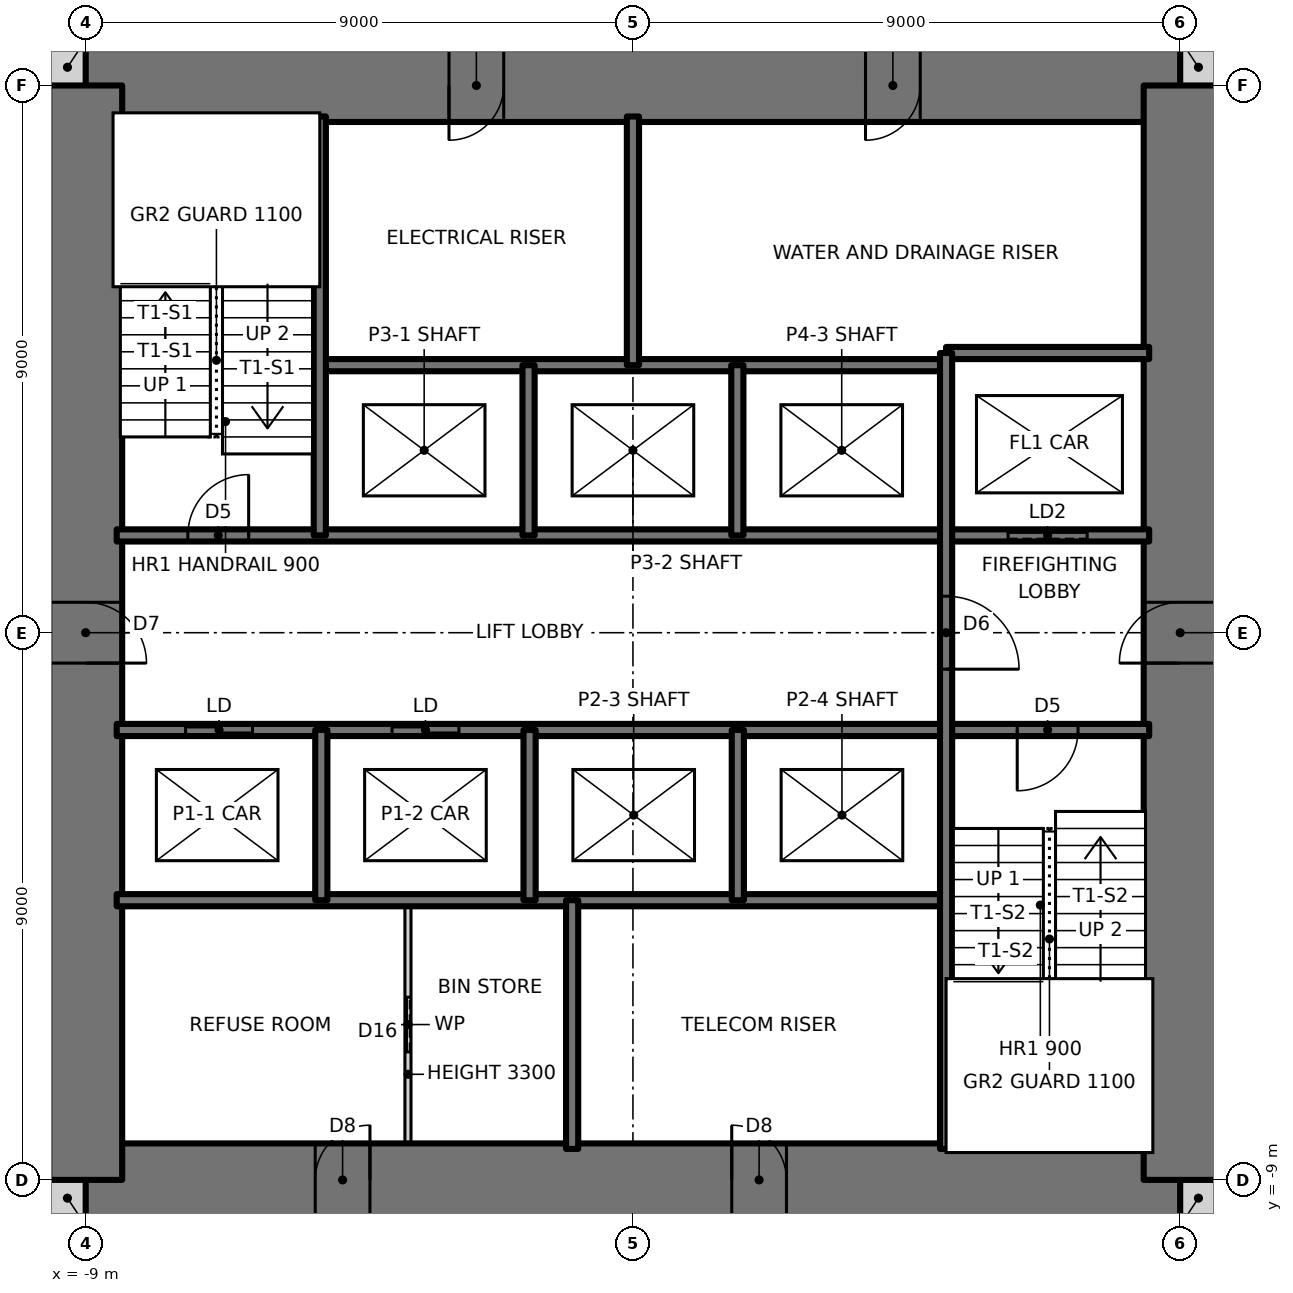
"""IFC4 building model, lengths in metres.
Left out: names, types, materials, properties, quantities, classifications, styles, units other than length and angle.
Written with IfcOpenShell. Run it as: python <this file> out.ifc"""

import sys

from ifc_helpers import new_model, si_unit, direction, frame, frame_2d, origin, place, context, subcontext, project, spatial, rectangle, extrude, element, fill, save


model = new_model("IFC4")
c1 = context("Model", 3, precision=1e-05, world=origin(), true_north=direction((0.0, 1.0)))
c2 = subcontext(c1, "Body", "Model", "MODEL_VIEW")
j1 = project(units=[si_unit("LENGTHUNIT", "METRE"), si_unit("PLANEANGLEUNIT", "RADIAN")], contexts=[c1])
p1 = place(None, origin())
s1 = spatial("IfcSite", under=j1, at=p1, CompositionType="ELEMENT")
p2 = place(p1, origin())
s2 = spatial("IfcBuilding", under=s1, at=p2, CompositionType="ELEMENT")
p3 = place(p2, frame((0.0, 0.0, 36.0)))
s3 = spatial("IfcBuildingStorey", under=s2, at=p3, CompositionType="ELEMENT", Elevation=36.0)
for number, where, z_axis, x_axis in (
    (1, (-9.6, -9.3, 0.0), (0.0, 0.0, 1.0), (1.0, 0.0, 0.0)),
    (2, (9.0, -9.3, 0.0), (0.0, 0.0, 1.0), (1.0, 0.0, 0.0)),
    (3, (9.0, 9.3, 0.0), (0.0, 0.0, 1.0), (1.0, 0.0, 0.0)),
    (4, (-9.6, 9.3, 0.0), (0.0, 0.0, 1.0), (1.0, 0.0, 0.0)),
):
    element("IfcWall", number, at=place(p3, frame(where, z_axis=z_axis, x_axis=x_axis)), inside=s3, PredefinedType="SOLIDWALL", context=c2, shape_type="SweptSolid", body=[
        extrude(rectangle(XDim=0.6, YDim=0.6, at=frame_2d((0.3, 0.0))), origin(), (0.0, 0.0, 1.0), 3.5),
    ])
p4 = place(p3, frame((-9.0, -9.0, 0.0), z_axis=(0.0, 0.0, 1.0), x_axis=(1.0, 0.0, 0.0)))
e5 = element("IfcWall", 5, at=p4, inside=s3, PredefinedType="SHEAR", context=c2, shape_type="SweptSolid", body=[
    extrude(rectangle(XDim=18.0, YDim=1.2, at=frame_2d((9.0, 0.0))), origin(), (0.0, 0.0, 1.0), 3.5),
])
p5 = place(p4, frame((3.775, 0.0, 0.0)))
e6 = element("IfcOpeningElement", 6, at=p5, cuts=e5, PredefinedType="OPENING", context=c2, shape_type="SweptSolid", body=[
    extrude(rectangle(XDim=0.9, YDim=2.1, at=frame_2d((0.45, 1.05))), frame((0.0, 0.61, 0.0), z_axis=(0.0, -1.0, 0.0), x_axis=(1.0, 0.0, 0.0)), (0.0, 0.0, 1.0), 1.22),
])
p6 = place(p4, frame((10.625, 0.0, 0.0)))
e7 = element("IfcOpeningElement", 7, at=p6, cuts=e5, PredefinedType="OPENING", context=c2, shape_type="SweptSolid", body=[
    extrude(rectangle(XDim=0.9, YDim=2.1, at=frame_2d((0.45, 1.05))), frame((0.0, 0.61, 0.0), z_axis=(0.0, -1.0, 0.0), x_axis=(1.0, 0.0, 0.0)), (0.0, 0.0, 1.0), 1.22),
])
p7 = place(p3, frame((9.0, 9.0, 0.0), z_axis=(0.0, 0.0, 1.0), x_axis=(-1.0, 0.0, 0.0)))
e8 = element("IfcWall", 8, at=p7, inside=s3, PredefinedType="SHEAR", context=c2, shape_type="SweptSolid", body=[
    extrude(rectangle(XDim=18.0, YDim=1.2, at=frame_2d((9.0, 0.0))), origin(), (0.0, 0.0, 1.0), 3.5),
])
p8 = place(p7, frame((11.125, 0.0, 0.0)))
e9 = element("IfcOpeningElement", 9, at=p8, cuts=e8, PredefinedType="OPENING", context=c2, shape_type="SweptSolid", body=[
    extrude(rectangle(XDim=0.9, YDim=2.1, at=frame_2d((0.45, 1.05))), frame((0.0, 0.61, 0.0), z_axis=(0.0, -1.0, 0.0), x_axis=(1.0, 0.0, 0.0)), (0.0, 0.0, 1.0), 1.22),
])
p9 = place(p7, frame((4.275, 0.0, 0.0)))
e10 = element("IfcOpeningElement", 10, at=p9, cuts=e8, PredefinedType="OPENING", context=c2, shape_type="SweptSolid", body=[
    extrude(rectangle(XDim=0.9, YDim=2.1, at=frame_2d((0.45, 1.05))), frame((0.0, 0.61, 0.0), z_axis=(0.0, -1.0, 0.0), x_axis=(1.0, 0.0, 0.0)), (0.0, 0.0, 1.0), 1.22),
])
p10 = place(p3, frame((9.0, -9.0, 0.0), z_axis=(0.0, 0.0, 1.0), x_axis=(0.0, 1.0, 0.0)))
e11 = element("IfcWall", 11, at=p10, inside=s3, PredefinedType="SHEAR", context=c2, shape_type="SweptSolid", body=[
    extrude(rectangle(XDim=18.0, YDim=1.2, at=frame_2d((9.0, 0.0))), origin(), (0.0, 0.0, 1.0), 3.5),
])
p11 = place(p10, frame((8.5, 0.0, 0.0)))
e12 = element("IfcOpeningElement", 12, at=p11, cuts=e11, PredefinedType="OPENING", context=c2, shape_type="SweptSolid", body=[
    extrude(rectangle(XDim=1.0, YDim=2.1, at=frame_2d((0.5, 1.05))), frame((0.0, 0.61, 0.0), z_axis=(0.0, -1.0, 0.0), x_axis=(1.0, 0.0, 0.0)), (0.0, 0.0, 1.0), 1.22),
])
p12 = place(p3, frame((-9.0, 9.0, 0.0), z_axis=(0.0, 0.0, 1.0), x_axis=(0.0, -1.0, 0.0)))
e13 = element("IfcWall", 13, at=p12, inside=s3, PredefinedType="SHEAR", context=c2, shape_type="SweptSolid", body=[
    extrude(rectangle(XDim=18.0, YDim=1.2, at=frame_2d((9.0, 0.0))), origin(), (0.0, 0.0, 1.0), 3.5),
])
p13 = place(p12, frame((8.5, 0.0, 0.0)))
e14 = element("IfcOpeningElement", 14, at=p13, cuts=e13, PredefinedType="OPENING", context=c2, shape_type="SweptSolid", body=[
    extrude(rectangle(XDim=1.0, YDim=2.1, at=frame_2d((0.5, 1.05))), frame((0.0, 0.61, 0.0), z_axis=(0.0, -1.0, 0.0), x_axis=(1.0, 0.0, 0.0)), (0.0, 0.0, 1.0), 1.22),
])
p14 = place(p3, frame((-8.49, -4.4, 0.0), z_axis=(0.0, 0.0, 1.0), x_axis=(1.0, 0.0, 0.0)))
e15 = element("IfcWall", 15, at=p14, inside=s3, PredefinedType="SOLIDWALL", context=c2, shape_type="SweptSolid", body=[
    extrude(rectangle(XDim=13.64, YDim=0.2, at=frame_2d((6.82, 0.0))), origin(), (0.0, 0.0, 1.0), 3.5),
])
p15 = place(p3, frame((-8.49, -1.6, 0.0), z_axis=(0.0, 0.0, 1.0), x_axis=(1.0, 0.0, 0.0)))
e16 = element("IfcWall", 16, at=p15, inside=s3, PredefinedType="SOLIDWALL", context=c2, shape_type="SweptSolid", body=[
    extrude(rectangle(XDim=16.98, YDim=0.2, at=frame_2d((8.49, 0.0))), origin(), (0.0, 0.0, 1.0), 3.5),
])
p16 = place(p15, frame((14.81, 0.0, 0.0)))
e17 = element("IfcOpeningElement", 17, at=p16, cuts=e16, PredefinedType="OPENING", context=c2, shape_type="SweptSolid", body=[
    extrude(rectangle(XDim=1.0, YDim=2.1, at=frame_2d((0.5, 1.05))), frame((0.0, 0.11, 0.0), z_axis=(0.0, -1.0, 0.0), x_axis=(1.0, 0.0, 0.0)), (0.0, 0.0, 1.0), 0.22),
])
p17 = place(p15, frame((1.133, 0.0, 0.0)))
e18 = element("IfcOpeningElement", 18, at=p17, cuts=e16, PredefinedType="OPENING", context=c2, shape_type="SweptSolid", body=[
    extrude(rectangle(XDim=1.1, YDim=2.1, at=frame_2d((0.55, 1.05))), frame((0.0, 0.11, 0.0), z_axis=(0.0, -1.0, 0.0), x_axis=(1.0, 0.0, 0.0)), (0.0, 0.0, 1.0), 0.22),
])
p18 = place(p15, frame((4.528, 0.0, 0.0)))
e19 = element("IfcOpeningElement", 19, at=p18, cuts=e16, PredefinedType="OPENING", context=c2, shape_type="SweptSolid", body=[
    extrude(rectangle(XDim=1.1, YDim=2.1, at=frame_2d((0.55, 1.05))), frame((0.0, 0.11, 0.0), z_axis=(0.0, -1.0, 0.0), x_axis=(1.0, 0.0, 0.0)), (0.0, 0.0, 1.0), 0.22),
])
p19 = place(p3, frame((-8.49, 1.6, 0.0), z_axis=(0.0, 0.0, 1.0), x_axis=(1.0, 0.0, 0.0)))
e20 = element("IfcWall", 20, at=p19, inside=s3, PredefinedType="SOLIDWALL", context=c2, shape_type="SweptSolid", body=[
    extrude(rectangle(XDim=16.98, YDim=0.2, at=frame_2d((8.49, 0.0))), origin(), (0.0, 0.0, 1.0), 3.5),
])
p20 = place(p19, frame((1.17, 0.0, 0.0)))
e21 = element("IfcOpeningElement", 21, at=p20, cuts=e20, PredefinedType="OPENING", context=c2, shape_type="SweptSolid", body=[
    extrude(rectangle(XDim=1.0, YDim=2.1, at=frame_2d((0.5, 1.05))), frame((0.0, 0.11, 0.0), z_axis=(0.0, -1.0, 0.0), x_axis=(1.0, 0.0, 0.0)), (0.0, 0.0, 1.0), 0.22),
])
p21 = place(p19, frame((14.66, 0.0, 0.0)))
e22 = element("IfcOpeningElement", 22, at=p21, cuts=e20, PredefinedType="OPENING", context=c2, shape_type="SweptSolid", body=[
    extrude(rectangle(XDim=1.3, YDim=2.1, at=frame_2d((0.65, 1.05))), frame((0.0, 0.11, 0.0), z_axis=(0.0, -1.0, 0.0), x_axis=(1.0, 0.0, 0.0)), (0.0, 0.0, 1.0), 0.22),
])
p22 = place(p3, frame((-5.15, 4.4, 0.0), z_axis=(0.0, 0.0, 1.0), x_axis=(1.0, 0.0, 0.0)))
e23 = element("IfcWall", 23, at=p22, inside=s3, PredefinedType="SOLIDWALL", context=c2, shape_type="SweptSolid", body=[
    extrude(rectangle(XDim=10.3, YDim=0.2, at=frame_2d((5.15, 0.0))), origin(), (0.0, 0.0, 1.0), 3.5),
])
p23 = place(p3, frame((5.15, 4.6, 0.0), z_axis=(0.0, 0.0, 1.0), x_axis=(1.0, 0.0, 0.0)))
e24 = element("IfcWall", 24, at=p23, inside=s3, PredefinedType="SOLIDWALL", context=c2, shape_type="SweptSolid", body=[
    extrude(rectangle(XDim=3.34, YDim=0.2, at=frame_2d((1.67, 0.0))), origin(), (0.0, 0.0, 1.0), 3.5),
])
p24 = place(p3, frame((5.15, -8.49, 0.0), z_axis=(0.0, 0.0, 1.0), x_axis=(0.0, 1.0, 0.0)))
e25 = element("IfcWall", 25, at=p24, inside=s3, PredefinedType="SOLIDWALL", context=c2, shape_type="SweptSolid", body=[
    extrude(rectangle(XDim=13.09, YDim=0.2, at=frame_2d((6.545, 0.0))), origin(), (0.0, 0.0, 1.0), 3.5),
])
p25 = place(p24, frame((7.89, 0.0, 0.0)))
e26 = element("IfcOpeningElement", 26, at=p25, cuts=e25, PredefinedType="OPENING", context=c2, shape_type="SweptSolid", body=[
    extrude(rectangle(XDim=1.2, YDim=2.1, at=frame_2d((0.6, 1.05))), frame((0.0, 0.11, 0.0), z_axis=(0.0, -1.0, 0.0), x_axis=(1.0, 0.0, 0.0)), (0.0, 0.0, 1.0), 0.22),
])
for number, where, z_axis, x_axis in (
    (27, (1.725, -4.4, 0.0), (0.0, 0.0, 1.0), (0.0, 1.0, 0.0)),
    (28, (1.717, 1.6, 0.0), (0.0, 0.0, 1.0), (0.0, 1.0, 0.0)),
):
    element("IfcWall", number, at=place(p3, frame(where, z_axis=z_axis, x_axis=x_axis)), inside=s3, PredefinedType="SOLIDWALL", context=c2, shape_type="SweptSolid", body=[
        extrude(rectangle(XDim=2.8, YDim=0.2, at=frame_2d((1.4, 0.0))), origin(), (0.0, 0.0, 1.0), 3.5),
    ])
for number, where, z_axis, x_axis in (
    (29, (0.0, 4.4, 0.0), (0.0, 0.0, 1.0), (0.0, 1.0, 0.0)),
    (30, (-1.0, -8.49, 0.0), (0.0, 0.0, 1.0), (0.0, 1.0, 0.0)),
):
    element("IfcWall", number, at=place(p3, frame(where, z_axis=z_axis, x_axis=x_axis)), inside=s3, PredefinedType="SOLIDWALL", context=c2, shape_type="SweptSolid", body=[
        extrude(rectangle(XDim=4.09, YDim=0.2, at=frame_2d((2.045, 0.0))), origin(), (0.0, 0.0, 1.0), 3.5),
    ])
for number, where, z_axis, x_axis in (
    (31, (-1.7, -4.4, 0.0), (0.0, 0.0, 1.0), (0.0, 1.0, 0.0)),
    (32, (-1.717, 1.6, 0.0), (0.0, 0.0, 1.0), (0.0, 1.0, 0.0)),
):
    element("IfcWall", number, at=place(p3, frame(where, z_axis=z_axis, x_axis=x_axis)), inside=s3, PredefinedType="SOLIDWALL", context=c2, shape_type="SweptSolid", body=[
        extrude(rectangle(XDim=2.8, YDim=0.2, at=frame_2d((1.4, 0.0))), origin(), (0.0, 0.0, 1.0), 3.5),
    ])
p26 = place(p3, frame((-3.7, -8.49, 0.0), z_axis=(0.0, 0.0, 1.0), x_axis=(0.0, 1.0, 0.0)))
e33 = element("IfcWall", 33, at=p26, inside=s3, PredefinedType="PARTITIONING", context=c2, shape_type="SweptSolid", body=[
    extrude(rectangle(XDim=4.09, YDim=0.1, at=frame_2d((2.045, 0.0))), origin(), (0.0, 0.0, 1.0), 3.3),
])
p27 = place(p26, frame((1.595, 0.0, 0.0)))
e34 = element("IfcOpeningElement", 34, at=p27, cuts=e33, PredefinedType="OPENING", context=c2, shape_type="SweptSolid", body=[
    extrude(rectangle(XDim=0.9, YDim=2.1, at=frame_2d((0.45, 1.05))), frame((0.0, 0.06, 0.0), z_axis=(0.0, -1.0, 0.0), x_axis=(1.0, 0.0, 0.0)), (0.0, 0.0, 1.0), 0.12),
])
p28 = place(p3, frame((-5.125, -4.4, 0.0), z_axis=(0.0, 0.0, 1.0), x_axis=(0.0, 1.0, 0.0)))
e35 = element("IfcWall", 35, at=p28, inside=s3, PredefinedType="SOLIDWALL", context=c2, shape_type="SweptSolid", body=[
    extrude(rectangle(XDim=2.8, YDim=0.2, at=frame_2d((1.4, 0.0))), origin(), (0.0, 0.0, 1.0), 3.5),
])
p29 = place(p3, frame((-5.15, 1.6, 0.0), z_axis=(0.0, 0.0, 1.0), x_axis=(0.0, 1.0, 0.0)))
e36 = element("IfcWall", 36, at=p29, inside=s3, PredefinedType="SOLIDWALL", context=c2, shape_type="SweptSolid", body=[
    extrude(rectangle(XDim=6.89, YDim=0.2, at=frame_2d((3.445, 0.0))), origin(), (0.0, 0.0, 1.0), 3.5),
])
p30 = place(p20, origin())
e37 = element("IfcDoor", 37, at=p30, inside=s3, OperationType="SINGLE_SWING_RIGHT", PredefinedType="DOOR", context=c2, shape_type="SweptSolid", body=[
    extrude(rectangle(XDim=1.0, YDim=2.1, at=frame_2d((0.5, 1.05))), frame((0.0, 0.025, 0.0), z_axis=(0.0, -1.0, 0.0), x_axis=(1.0, 0.0, 0.0)), (0.0, 0.0, 1.0), 0.05),
])
fill(e21, e37)
p31 = place(p16, frame((1.0, 0.0, 0.0), z_axis=(0.0, 0.0, 1.0), x_axis=(-1.0, 0.0, 0.0)))
e38 = element("IfcDoor", 38, at=p31, inside=s3, OperationType="SINGLE_SWING_RIGHT", PredefinedType="DOOR", context=c2, shape_type="SweptSolid", body=[
    extrude(rectangle(XDim=1.0, YDim=2.1, at=frame_2d((0.5, 1.05))), frame((0.0, 0.025, 0.0), z_axis=(0.0, -1.0, 0.0), x_axis=(1.0, 0.0, 0.0)), (0.0, 0.0, 1.0), 0.05),
])
fill(e17, e38)
p32 = place(p25, frame((1.2, 0.0, 0.0), z_axis=(0.0, 0.0, 1.0), x_axis=(-1.0, 0.0, 0.0)))
e39 = element("IfcDoor", 39, at=p32, inside=s3, OperationType="SINGLE_SWING_RIGHT", PredefinedType="DOOR", context=c2, shape_type="SweptSolid", body=[
    extrude(rectangle(XDim=1.2, YDim=2.1, at=frame_2d((0.6, 1.05))), frame((0.0, 0.025, 0.0), z_axis=(0.0, -1.0, 0.0), x_axis=(1.0, 0.0, 0.0)), (0.0, 0.0, 1.0), 0.05),
])
fill(e26, e39)
p33 = place(p27, origin())
e40 = element("IfcDoor", 40, at=p33, inside=s3, OperationType="SLIDING_TO_LEFT", PredefinedType="DOOR", context=c2, shape_type="SweptSolid", body=[
    extrude(rectangle(XDim=0.9, YDim=2.1, at=frame_2d((0.45, 1.05))), frame((0.0, 0.025, 0.0), z_axis=(0.0, -1.0, 0.0), x_axis=(1.0, 0.0, 0.0)), (0.0, 0.0, 1.0), 0.05),
])
fill(e34, e40)
p34 = place(p13, origin())
e41 = element("IfcDoor", 41, at=p34, inside=s3, OperationType="SINGLE_SWING_RIGHT", PredefinedType="DOOR", context=c2, shape_type="SweptSolid", body=[
    extrude(rectangle(XDim=1.0, YDim=2.1, at=frame_2d((0.5, 1.05))), frame((0.0, 0.025, 0.0), z_axis=(0.0, -1.0, 0.0), x_axis=(1.0, 0.0, 0.0)), (0.0, 0.0, 1.0), 0.05),
])
fill(e14, e41)
p35 = place(p11, origin())
e42 = element("IfcDoor", 42, at=p35, inside=s3, OperationType="SINGLE_SWING_LEFT", PredefinedType="DOOR", context=c2, shape_type="SweptSolid", body=[
    extrude(rectangle(XDim=1.0, YDim=2.1, at=frame_2d((0.5, 1.05))), frame((0.0, 0.025, 0.0), z_axis=(0.0, -1.0, 0.0), x_axis=(1.0, 0.0, 0.0)), (0.0, 0.0, 1.0), 0.05),
])
fill(e12, e42)
p36 = place(p8, origin())
e43 = element("IfcDoor", 43, at=p36, inside=s3, OperationType="SINGLE_SWING_RIGHT", PredefinedType="DOOR", context=c2, shape_type="SweptSolid", body=[
    extrude(rectangle(XDim=0.9, YDim=2.1, at=frame_2d((0.45, 1.05))), frame((0.0, 0.025, 0.0), z_axis=(0.0, -1.0, 0.0), x_axis=(1.0, 0.0, 0.0)), (0.0, 0.0, 1.0), 0.05),
])
fill(e9, e43)
p37 = place(p9, origin())
e44 = element("IfcDoor", 44, at=p37, inside=s3, OperationType="SINGLE_SWING_RIGHT", PredefinedType="DOOR", context=c2, shape_type="SweptSolid", body=[
    extrude(rectangle(XDim=0.9, YDim=2.1, at=frame_2d((0.45, 1.05))), frame((0.0, 0.025, 0.0), z_axis=(0.0, -1.0, 0.0), x_axis=(1.0, 0.0, 0.0)), (0.0, 0.0, 1.0), 0.05),
])
fill(e10, e44)
p38 = place(p5, origin())
e45 = element("IfcDoor", 45, at=p38, inside=s3, OperationType="SINGLE_SWING_RIGHT", PredefinedType="DOOR", context=c2, shape_type="SweptSolid", body=[
    extrude(rectangle(XDim=0.9, YDim=2.1, at=frame_2d((0.45, 1.05))), frame((0.0, 0.025, 0.0), z_axis=(0.0, -1.0, 0.0), x_axis=(1.0, 0.0, 0.0)), (0.0, 0.0, 1.0), 0.05),
])
fill(e6, e45)
p39 = place(p6, origin())
e46 = element("IfcDoor", 46, at=p39, inside=s3, OperationType="SINGLE_SWING_LEFT", PredefinedType="DOOR", context=c2, shape_type="SweptSolid", body=[
    extrude(rectangle(XDim=0.9, YDim=2.1, at=frame_2d((0.45, 1.05))), frame((0.0, 0.025, 0.0), z_axis=(0.0, -1.0, 0.0), x_axis=(1.0, 0.0, 0.0)), (0.0, 0.0, 1.0), 0.05),
])
fill(e7, e46)
p40 = place(p17, origin())
e47 = element("IfcDoor", 47, at=p40, inside=s3, OperationType="DOUBLE_DOOR_SLIDING", PredefinedType="DOOR", context=c2, shape_type="SweptSolid", body=[
    extrude(rectangle(XDim=1.1, YDim=2.1, at=frame_2d((0.55, 1.05))), frame((0.0, 0.025, 0.0), z_axis=(0.0, -1.0, 0.0), x_axis=(1.0, 0.0, 0.0)), (0.0, 0.0, 1.0), 0.05),
])
fill(e18, e47)
p41 = place(p18, origin())
e48 = element("IfcDoor", 48, at=p41, inside=s3, OperationType="DOUBLE_DOOR_SLIDING", PredefinedType="DOOR", context=c2, shape_type="SweptSolid", body=[
    extrude(rectangle(XDim=1.1, YDim=2.1, at=frame_2d((0.55, 1.05))), frame((0.0, 0.025, 0.0), z_axis=(0.0, -1.0, 0.0), x_axis=(1.0, 0.0, 0.0)), (0.0, 0.0, 1.0), 0.05),
])
fill(e19, e48)
p42 = place(p21, origin())
e49 = element("IfcDoor", 49, at=p42, inside=s3, OperationType="SLIDING_TO_LEFT", PredefinedType="DOOR", context=c2, shape_type="SweptSolid", body=[
    extrude(rectangle(XDim=1.3, YDim=2.1, at=frame_2d((0.65, 1.05))), frame((0.0, 0.025, 0.0), z_axis=(0.0, -1.0, 0.0), x_axis=(1.0, 0.0, 0.0)), (0.0, 0.0, 1.0), 0.05),
])
fill(e22, e49)
save(model, sys.argv[1])
